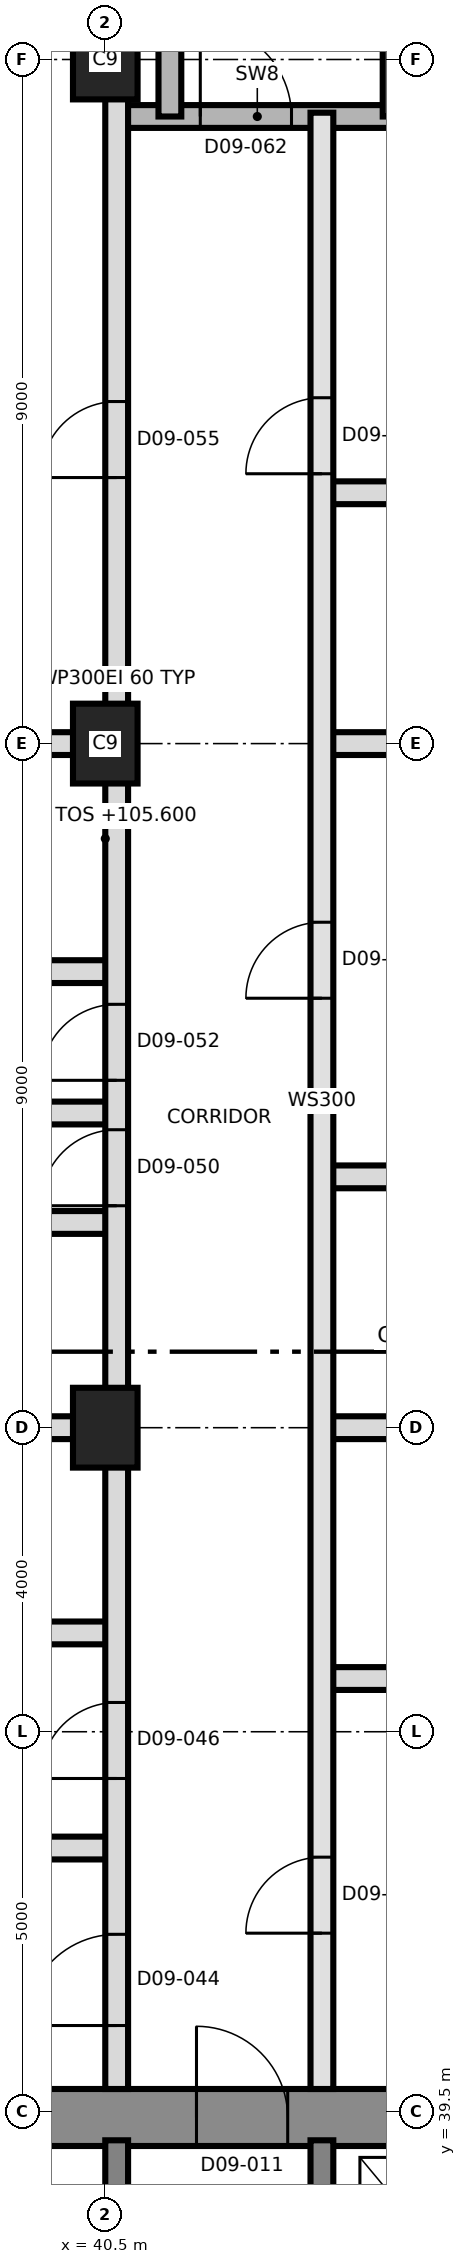
"""IFC4 building model, lengths in metres.
Left out: names, types, materials, properties, quantities, classifications, styles, units other than length and angle.
Written with IfcOpenShell. Run it as: python <this file> out.ifc"""

import sys

from ifc_helpers import new_model, si_unit, direction, frame, frame_2d, origin, origin_2d, place, context, subcontext, project, spatial, rectangle, extrude, element, fill, save


model = new_model("IFC4")
c1 = context("Model", 3, precision=1e-05, world=origin(), true_north=direction((0.0, 1.0)))
c2 = subcontext(c1, "Body", "Model", "MODEL_VIEW")
j1 = project(units=[si_unit("LENGTHUNIT", "METRE"), si_unit("PLANEANGLEUNIT", "RADIAN")], contexts=[c1])
p1 = place(None, origin())
s1 = spatial("IfcSite", under=j1, at=p1, CompositionType="ELEMENT")
p2 = place(p1, origin())
s2 = spatial("IfcBuilding", under=s1, at=p2, CompositionType="ELEMENT")
p3 = place(p2, frame((0.0, 0.0, 105.6)))
s3 = spatial("IfcBuildingStorey", under=s2, at=p3, CompositionType="ELEMENT", Elevation=105.6)
p4 = place(p3, frame((31.125, 39.425, 0.0), z_axis=(0.0, 0.0, 1.0), x_axis=(1.0, 0.0, 0.0)))
e1 = element("IfcWall", 1, at=p4, inside=s3, PredefinedType="SHEAR", context=c2, shape_type="SweptSolid", body=[
    extrude(rectangle(XDim=27.0, YDim=0.75, at=frame_2d((13.5, 0.0))), origin(), (0.0, 0.0, 1.0), 3.7),
])
p5 = place(p4, frame((10.575, 0.0, 0.0)))
e2 = element("IfcOpeningElement", 2, at=p5, cuts=e1, PredefinedType="OPENING", context=c2, shape_type="SweptSolid", body=[
    extrude(rectangle(XDim=1.2, YDim=2.1, at=frame_2d((0.6, 1.05))), frame((0.0, 0.385, 0.0), z_axis=(0.0, -1.0, 0.0), x_axis=(1.0, 0.0, 0.0)), (0.0, 0.0, 1.0), 0.77),
])
for number, where, z_axis, x_axis in (
    (3, (40.65, 33.5, 0.0), (0.0, 0.0, 1.0), (0.0, 1.0, 0.0)),
    (4, (43.35, 33.5, 0.0), (0.0, 0.0, 1.0), (0.0, 1.0, 0.0)),
):
    element("IfcWall", number, at=place(p3, frame(where, z_axis=z_axis, x_axis=x_axis)), inside=s3, PredefinedType="SHEAR", context=c2, shape_type="SweptSolid", body=[
        extrude(rectangle(XDim=5.625, YDim=0.3, at=frame_2d((2.812, 0.0))), origin(), (0.0, 0.0, 1.0), 3.7),
    ])
for number, where, z_axis, x_axis in (
    (5, (40.5, 48.5, 0.0), (0.0, 0.0, 1.0), (0.0, 1.0, 0.0)),
    (6, (40.5, 57.5, 0.0), (0.0, 0.0, 1.0), (0.0, 1.0, 0.0)),
    (7, (40.5, 66.5, 0.0), (0.0, 0.0, 1.0), (0.0, 1.0, 0.0)),
):
    element("IfcColumn", number, at=place(p3, frame(where, z_axis=z_axis, x_axis=x_axis)), inside=s3, PredefinedType="COLUMN", context=c2, shape_type="SweptSolid", body=[
        extrude(rectangle(XDim=1.05, YDim=0.85, at=origin_2d()), origin(), (0.0, 0.0, 1.0), 3.7),
    ])
p6 = place(p3, frame((30.35, 42.97, 0.0), z_axis=(0.0, 0.0, 1.0), x_axis=(1.0, 0.0, 0.0)))
e8 = element("IfcWall", 8, at=p6, inside=s3, PredefinedType="PARTITIONING", context=c2, shape_type="SweptSolid", body=[
    extrude(rectangle(XDim=10.3, YDim=0.3, at=frame_2d((5.15, 0.0))), origin(), (0.0, 0.0, 1.0), 3.4),
])
p7 = place(p3, frame((43.35, 45.2, 0.0), z_axis=(0.0, 0.0, 1.0), x_axis=(1.0, 0.0, 0.0)))
e9 = element("IfcWall", 9, at=p7, inside=s3, PredefinedType="PARTITIONING", context=c2, shape_type="SweptSolid", body=[
    extrude(rectangle(XDim=3.5, YDim=0.3, at=frame_2d((1.75, 0.0))), origin(), (0.0, 0.0, 1.0), 3.4),
])
p8 = place(p3, frame((37.45, 45.8, 0.0), z_axis=(0.0, 0.0, 1.0), x_axis=(1.0, 0.0, 0.0)))
e10 = element("IfcWall", 10, at=p8, inside=s3, PredefinedType="PARTITIONING", context=c2, shape_type="SweptSolid", body=[
    extrude(rectangle(XDim=3.2, YDim=0.3, at=frame_2d((1.6, 0.0))), origin(), (0.0, 0.0, 1.0), 3.4),
])
p9 = place(p3, frame((30.35, 48.5, 0.0), z_axis=(0.0, 0.0, 1.0), x_axis=(1.0, 0.0, 0.0)))
e11 = element("IfcWall", 11, at=p9, inside=s3, PredefinedType="PARTITIONING", context=c2, shape_type="SweptSolid", body=[
    extrude(rectangle(XDim=10.3, YDim=0.3, at=frame_2d((5.15, 0.0))), origin(), (0.0, 0.0, 1.0), 3.4),
])
p10 = place(p3, frame((43.35, 48.5, 0.0), z_axis=(0.0, 0.0, 1.0), x_axis=(1.0, 0.0, 0.0)))
e12 = element("IfcWall", 12, at=p10, inside=s3, PredefinedType="PARTITIONING", context=c2, shape_type="SweptSolid", body=[
    extrude(rectangle(XDim=7.48, YDim=0.3, at=frame_2d((3.74, 0.0))), origin(), (0.0, 0.0, 1.0), 3.4),
])
p11 = place(p3, frame((37.35, 51.2, 0.0), z_axis=(0.0, 0.0, 1.0), x_axis=(1.0, 0.0, 0.0)))
e13 = element("IfcWall", 13, at=p11, inside=s3, PredefinedType="PARTITIONING", context=c2, shape_type="SweptSolid", body=[
    extrude(rectangle(XDim=3.3, YDim=0.3, at=frame_2d((1.65, 0.0))), origin(), (0.0, 0.0, 1.0), 3.4),
])
p12 = place(p3, frame((43.35, 51.8, 0.0), z_axis=(0.0, 0.0, 1.0), x_axis=(1.0, 0.0, 0.0)))
e14 = element("IfcWall", 14, at=p12, inside=s3, PredefinedType="PARTITIONING", context=c2, shape_type="SweptSolid", body=[
    extrude(rectangle(XDim=3.5, YDim=0.3, at=frame_2d((1.75, 0.0))), origin(), (0.0, 0.0, 1.0), 3.4),
])
p13 = place(p3, frame((30.35, 52.64, 0.0), z_axis=(0.0, 0.0, 1.0), x_axis=(1.0, 0.0, 0.0)))
e15 = element("IfcWall", 15, at=p13, inside=s3, PredefinedType="PARTITIONING", context=c2, shape_type="SweptSolid", body=[
    extrude(rectangle(XDim=10.3, YDim=0.3, at=frame_2d((5.15, 0.0))), origin(), (0.0, 0.0, 1.0), 3.4),
])
p14 = place(p3, frame((37.35, 54.5, 0.0), z_axis=(0.0, 0.0, 1.0), x_axis=(1.0, 0.0, 0.0)))
e16 = element("IfcWall", 16, at=p14, inside=s3, PredefinedType="PARTITIONING", context=c2, shape_type="SweptSolid", body=[
    extrude(rectangle(XDim=3.3, YDim=0.3, at=frame_2d((1.65, 0.0))), origin(), (0.0, 0.0, 1.0), 3.4),
])
p15 = place(p3, frame((30.35, 57.5, 0.0), z_axis=(0.0, 0.0, 1.0), x_axis=(1.0, 0.0, 0.0)))
e17 = element("IfcWall", 17, at=p15, inside=s3, PredefinedType="PARTITIONING", context=c2, shape_type="SweptSolid", body=[
    extrude(rectangle(XDim=10.3, YDim=0.3, at=frame_2d((5.15, 0.0))), origin(), (0.0, 0.0, 1.0), 3.4),
])
p16 = place(p3, frame((43.35, 57.5, 0.0), z_axis=(0.0, 0.0, 1.0), x_axis=(1.0, 0.0, 0.0)))
e18 = element("IfcWall", 18, at=p16, inside=s3, PredefinedType="PARTITIONING", context=c2, shape_type="SweptSolid", body=[
    extrude(rectangle(XDim=7.48, YDim=0.3, at=frame_2d((3.74, 0.0))), origin(), (0.0, 0.0, 1.0), 3.4),
])
p17 = place(p3, frame((43.35, 60.8, 0.0), z_axis=(0.0, 0.0, 1.0), x_axis=(1.0, 0.0, 0.0)))
e19 = element("IfcWall", 19, at=p17, inside=s3, PredefinedType="PARTITIONING", context=c2, shape_type="SweptSolid", body=[
    extrude(rectangle(XDim=3.5, YDim=0.3, at=frame_2d((1.75, 0.0))), origin(), (0.0, 0.0, 1.0), 3.4),
])
p18 = place(p3, frame((40.65, 65.75, 0.0), z_axis=(0.0, 0.0, 1.0), x_axis=(1.0, 0.0, 0.0)))
e20 = element("IfcWall", 20, at=p18, inside=s3, PredefinedType="SHEAR", context=c2, shape_type="SweptSolid", body=[
    extrude(rectangle(XDim=3.7, YDim=0.3, at=frame_2d((1.85, 0.0))), origin(), (0.0, 0.0, 1.0), 3.4),
])
p19 = place(p18, frame((1.1, 0.0, 0.0)))
e21 = element("IfcOpeningElement", 21, at=p19, cuts=e20, PredefinedType="OPENING", context=c2, shape_type="SweptSolid", body=[
    extrude(rectangle(XDim=1.2, YDim=2.1, at=frame_2d((0.6, 1.05))), frame((0.0, 0.16, 0.0), z_axis=(0.0, -1.0, 0.0), x_axis=(1.0, 0.0, 0.0)), (0.0, 0.0, 1.0), 0.32),
])
p20 = place(p3, frame((40.65, 39.8, 0.0), z_axis=(0.0, 0.0, 1.0), x_axis=(0.0, 1.0, 0.0)))
e22 = element("IfcWall", 22, at=p20, inside=s3, PredefinedType="PARTITIONING", context=c2, shape_type="SweptSolid", body=[
    extrude(rectangle(XDim=37.09, YDim=0.3, at=frame_2d((18.545, 0.0))), origin(), (0.0, 0.0, 1.0), 3.4),
])
p21 = place(p20, frame((0.835, 0.0, 0.0)))
e23 = element("IfcOpeningElement", 23, at=p21, cuts=e22, PredefinedType="OPENING", context=c2, shape_type="SweptSolid", body=[
    extrude(rectangle(XDim=1.2, YDim=2.1, at=frame_2d((0.6, 1.05))), frame((0.0, 0.16, 0.0), z_axis=(0.0, -1.0, 0.0), x_axis=(1.0, 0.0, 0.0)), (0.0, 0.0, 1.0), 0.32),
])
p22 = place(p20, frame((4.085, 0.0, 0.0)))
e24 = element("IfcOpeningElement", 24, at=p22, cuts=e22, PredefinedType="OPENING", context=c2, shape_type="SweptSolid", body=[
    extrude(rectangle(XDim=1.0, YDim=2.1, at=frame_2d((0.5, 1.05))), frame((0.0, 0.16, 0.0), z_axis=(0.0, -1.0, 0.0), x_axis=(1.0, 0.0, 0.0)), (0.0, 0.0, 1.0), 0.32),
])
p23 = place(p20, frame((11.62, 0.0, 0.0)))
e25 = element("IfcOpeningElement", 25, at=p23, cuts=e22, PredefinedType="OPENING", context=c2, shape_type="SweptSolid", body=[
    extrude(rectangle(XDim=1.0, YDim=2.4, at=frame_2d((0.5, 1.2))), frame((0.0, 0.16, 0.0), z_axis=(0.0, -1.0, 0.0), x_axis=(1.0, 0.0, 0.0)), (0.0, 0.0, 1.0), 0.32),
])
p24 = place(p20, frame((13.27, 0.0, 0.0)))
e26 = element("IfcOpeningElement", 26, at=p24, cuts=e22, PredefinedType="OPENING", context=c2, shape_type="SweptSolid", body=[
    extrude(rectangle(XDim=1.0, YDim=2.4, at=frame_2d((0.5, 1.2))), frame((0.0, 0.16, 0.0), z_axis=(0.0, -1.0, 0.0), x_axis=(1.0, 0.0, 0.0)), (0.0, 0.0, 1.0), 0.32),
])
p25 = place(p20, frame((21.2, 0.0, 0.0)))
e27 = element("IfcOpeningElement", 27, at=p25, cuts=e22, PredefinedType="OPENING", context=c2, shape_type="SweptSolid", body=[
    extrude(rectangle(XDim=1.0, YDim=2.4, at=frame_2d((0.5, 1.2))), frame((0.0, 0.16, 0.0), z_axis=(0.0, -1.0, 0.0), x_axis=(1.0, 0.0, 0.0)), (0.0, 0.0, 1.0), 0.32),
])
p26 = place(p3, frame((41.35, 65.75, 0.0), z_axis=(0.0, 0.0, 1.0), x_axis=(0.0, 1.0, 0.0)))
e28 = element("IfcWall", 28, at=p26, inside=s3, PredefinedType="SHEAR", context=c2, shape_type="SweptSolid", body=[
    extrude(rectangle(XDim=8.85, YDim=0.3, at=frame_2d((4.425, 0.0))), origin(), (0.0, 0.0, 1.0), 3.4),
])
p27 = place(p3, frame((43.35, 39.8, 0.0), z_axis=(0.0, 0.0, 1.0), x_axis=(0.0, 1.0, 0.0)))
e29 = element("IfcWall", 29, at=p27, inside=s3, PredefinedType="SOLIDWALL", context=c2, shape_type="SweptSolid", body=[
    extrude(rectangle(XDim=26.0, YDim=0.3, at=frame_2d((13.0, 0.0))), origin(), (0.0, 0.0, 1.0), 3.4),
])
p28 = place(p27, frame((2.05, 0.0, 0.0)))
e30 = element("IfcOpeningElement", 30, at=p28, cuts=e29, PredefinedType="OPENING", context=c2, shape_type="SweptSolid", body=[
    extrude(rectangle(XDim=1.0, YDim=2.4, at=frame_2d((0.5, 1.2))), frame((0.0, 0.16, 0.0), z_axis=(0.0, -1.0, 0.0), x_axis=(1.0, 0.0, 0.0)), (0.0, 0.0, 1.0), 0.32),
])
p29 = place(p27, frame((14.35, 0.0, 0.0)))
e31 = element("IfcOpeningElement", 31, at=p29, cuts=e29, PredefinedType="OPENING", context=c2, shape_type="SweptSolid", body=[
    extrude(rectangle(XDim=1.0, YDim=2.4, at=frame_2d((0.5, 1.2))), frame((0.0, 0.16, 0.0), z_axis=(0.0, -1.0, 0.0), x_axis=(1.0, 0.0, 0.0)), (0.0, 0.0, 1.0), 0.32),
])
p30 = place(p27, frame((21.25, 0.0, 0.0)))
e32 = element("IfcOpeningElement", 32, at=p30, cuts=e29, PredefinedType="OPENING", context=c2, shape_type="SweptSolid", body=[
    extrude(rectangle(XDim=1.0, YDim=2.4, at=frame_2d((0.5, 1.2))), frame((0.0, 0.16, 0.0), z_axis=(0.0, -1.0, 0.0), x_axis=(1.0, 0.0, 0.0)), (0.0, 0.0, 1.0), 0.32),
])
p31 = place(p3, frame((44.3, 65.75, 0.0), z_axis=(0.0, 0.0, 1.0), x_axis=(0.0, 1.0, 0.0)))
e33 = element("IfcWall", 33, at=p31, inside=s3, PredefinedType="SHEAR", context=c2, shape_type="SweptSolid", body=[
    extrude(rectangle(XDim=8.85, YDim=0.3, at=frame_2d((4.425, 0.0))), origin(), (0.0, 0.0, 1.0), 3.4),
])
p32 = place(p5, origin())
e34 = element("IfcDoor", 34, at=p32, inside=s3, OperationType="SINGLE_SWING_RIGHT", PredefinedType="DOOR", context=c2, shape_type="SweptSolid", body=[
    extrude(rectangle(XDim=1.2, YDim=2.1, at=frame_2d((0.6, 1.05))), frame((0.0, 0.025, 0.0), z_axis=(0.0, -1.0, 0.0), x_axis=(1.0, 0.0, 0.0)), (0.0, 0.0, 1.0), 0.05),
])
fill(e2, e34)
p33 = place(p28, origin())
e35 = element("IfcDoor", 35, at=p33, inside=s3, OperationType="SINGLE_SWING_LEFT", PredefinedType="DOOR", context=c2, shape_type="SweptSolid", body=[
    extrude(rectangle(XDim=1.0, YDim=2.4, at=frame_2d((0.5, 1.2))), frame((0.0, 0.025, 0.0), z_axis=(0.0, -1.0, 0.0), x_axis=(1.0, 0.0, 0.0)), (0.0, 0.0, 1.0), 0.05),
])
fill(e30, e35)
p34 = place(p21, origin())
e36 = element("IfcDoor", 36, at=p34, inside=s3, OperationType="SINGLE_SWING_RIGHT", PredefinedType="DOOR", context=c2, shape_type="SweptSolid", body=[
    extrude(rectangle(XDim=1.2, YDim=2.1, at=frame_2d((0.6, 1.05))), frame((0.0, 0.025, 0.0), z_axis=(0.0, -1.0, 0.0), x_axis=(1.0, 0.0, 0.0)), (0.0, 0.0, 1.0), 0.05),
])
fill(e23, e36)
p35 = place(p22, origin())
e37 = element("IfcDoor", 37, at=p35, inside=s3, OperationType="SINGLE_SWING_LEFT", PredefinedType="DOOR", context=c2, shape_type="SweptSolid", body=[
    extrude(rectangle(XDim=1.0, YDim=2.1, at=frame_2d((0.5, 1.05))), frame((0.0, 0.025, 0.0), z_axis=(0.0, -1.0, 0.0), x_axis=(1.0, 0.0, 0.0)), (0.0, 0.0, 1.0), 0.05),
])
fill(e24, e37)
p36 = place(p29, origin())
e38 = element("IfcDoor", 38, at=p36, inside=s3, OperationType="SINGLE_SWING_RIGHT", PredefinedType="DOOR", context=c2, shape_type="SweptSolid", body=[
    extrude(rectangle(XDim=1.0, YDim=2.4, at=frame_2d((0.5, 1.2))), frame((0.0, 0.025, 0.0), z_axis=(0.0, -1.0, 0.0), x_axis=(1.0, 0.0, 0.0)), (0.0, 0.0, 1.0), 0.05),
])
fill(e31, e38)
p37 = place(p23, origin())
e39 = element("IfcDoor", 39, at=p37, inside=s3, OperationType="SINGLE_SWING_LEFT", PredefinedType="DOOR", context=c2, shape_type="SweptSolid", body=[
    extrude(rectangle(XDim=1.0, YDim=2.4, at=frame_2d((0.5, 1.2))), frame((0.0, 0.025, 0.0), z_axis=(0.0, -1.0, 0.0), x_axis=(1.0, 0.0, 0.0)), (0.0, 0.0, 1.0), 0.05),
])
fill(e25, e39)
p38 = place(p24, origin())
e40 = element("IfcDoor", 40, at=p38, inside=s3, OperationType="SINGLE_SWING_LEFT", PredefinedType="DOOR", context=c2, shape_type="SweptSolid", body=[
    extrude(rectangle(XDim=1.0, YDim=2.4, at=frame_2d((0.5, 1.2))), frame((0.0, 0.025, 0.0), z_axis=(0.0, -1.0, 0.0), x_axis=(1.0, 0.0, 0.0)), (0.0, 0.0, 1.0), 0.05),
])
fill(e26, e40)
p39 = place(p30, origin())
e41 = element("IfcDoor", 41, at=p39, inside=s3, OperationType="SINGLE_SWING_RIGHT", PredefinedType="DOOR", context=c2, shape_type="SweptSolid", body=[
    extrude(rectangle(XDim=1.0, YDim=2.4, at=frame_2d((0.5, 1.2))), frame((0.0, 0.025, 0.0), z_axis=(0.0, -1.0, 0.0), x_axis=(1.0, 0.0, 0.0)), (0.0, 0.0, 1.0), 0.05),
])
fill(e32, e41)
p40 = place(p25, origin())
e42 = element("IfcDoor", 42, at=p40, inside=s3, OperationType="SINGLE_SWING_LEFT", PredefinedType="DOOR", context=c2, shape_type="SweptSolid", body=[
    extrude(rectangle(XDim=1.0, YDim=2.4, at=frame_2d((0.5, 1.2))), frame((0.0, 0.025, 0.0), z_axis=(0.0, -1.0, 0.0), x_axis=(1.0, 0.0, 0.0)), (0.0, 0.0, 1.0), 0.05),
])
fill(e27, e42)
p41 = place(p19, origin())
e43 = element("IfcDoor", 43, at=p41, inside=s3, OperationType="SINGLE_SWING_RIGHT", PredefinedType="DOOR", context=c2, shape_type="SweptSolid", body=[
    extrude(rectangle(XDim=1.2, YDim=2.1, at=frame_2d((0.6, 1.05))), frame((0.0, 0.025, 0.0), z_axis=(0.0, -1.0, 0.0), x_axis=(1.0, 0.0, 0.0)), (0.0, 0.0, 1.0), 0.05),
])
fill(e21, e43)
save(model, sys.argv[1])
